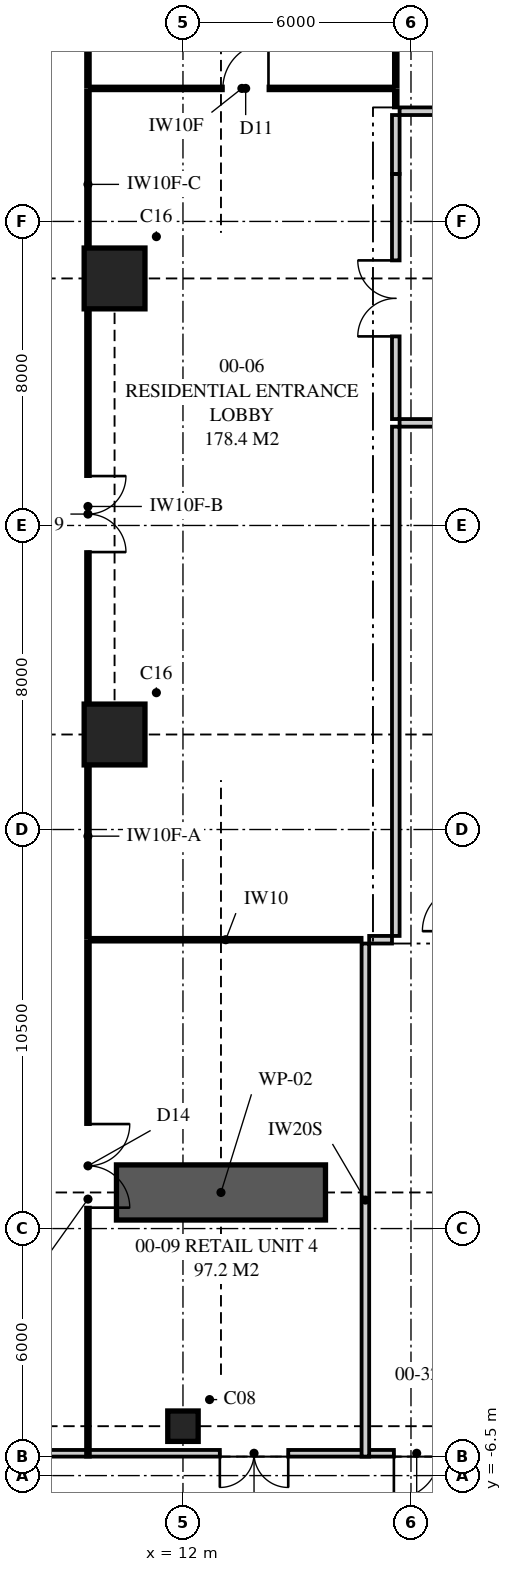
"""IFC4 building model, lengths in metres.
Left out: names, types, materials, properties, quantities, classifications, styles, units other than length and angle.
Written with IfcOpenShell. Run it as: python <this file> out.ifc"""

import sys

from ifc_helpers import new_model, si_unit, direction, frame, frame_2d, origin, origin_2d, place, context, subcontext, project, spatial, polyline, rectangle, outline, extrude, element, fill, save


model = new_model("IFC4")
c1 = context("Model", 3, precision=1e-05, world=origin(), true_north=direction((0.0, 1.0)))
c2 = subcontext(c1, "Body", "Model", "MODEL_VIEW")
j1 = project(units=[si_unit("LENGTHUNIT", "METRE"), si_unit("PLANEANGLEUNIT", "RADIAN")], contexts=[c1])
p1 = place(None, origin())
s1 = spatial("IfcSite", under=j1, at=p1, CompositionType="ELEMENT")
p2 = place(p1, origin())
s2 = spatial("IfcBuilding", under=s1, at=p2, CompositionType="ELEMENT")
p3 = place(p2, origin())
s3 = spatial("IfcBuildingStorey", under=s2, at=p3, CompositionType="ELEMENT", Elevation=0.0)
for number, where, z_axis, x_axis in (
    (1, (10.2, 13.0, 0.0), (0.0, 0.0, 1.0), (1.0, 0.0, 0.0)),
    (2, (10.2, 25.0, 0.0), (0.0, 0.0, 1.0), (1.0, 0.0, 0.0)),
):
    element("IfcColumn", number, at=place(p3, frame(where, z_axis=z_axis, x_axis=x_axis)), inside=s3, PredefinedType="COLUMN", context=c2, shape_type="SweptSolid", body=[
        extrude(rectangle(XDim=1.6, YDim=1.6, at=origin_2d()), origin(), (0.0, 0.0, 1.0), 6.0),
    ])
p4 = place(p3, frame((12.0, -5.2, 0.0), z_axis=(0.0, 0.0, 1.0), x_axis=(1.0, 0.0, 0.0)))
e3 = element("IfcColumn", 3, at=p4, inside=s3, PredefinedType="COLUMN", context=c2, shape_type="SweptSolid", body=[
    extrude(rectangle(XDim=0.8, YDim=0.8, at=origin_2d()), origin(), (0.0, 0.0, 1.0), 6.0),
])
p5 = place(p3, frame((-9.2, -5.913, 0.0), z_axis=(0.0, 0.0, 1.0), x_axis=(1.0, 0.0, 0.0)))
e4 = element("IfcWall", 4, at=p5, inside=s3, PredefinedType="SOLIDWALL", context=c2, shape_type="SweptSolid", body=[
    extrude(rectangle(XDim=68.4, YDim=0.175, at=frame_2d((34.2, 0.0))), origin(), (0.0, 0.0, 1.0), 5.12),
])
p6 = place(p5, frame((4.819, 0.0, 0.0)))
e5 = element("IfcOpeningElement", 5, at=p6, cuts=e4, PredefinedType="OPENING", context=c2, shape_type="SweptSolid", body=[
    extrude(rectangle(XDim=1.8, YDim=2.7, at=frame_2d((0.9, 1.35))), frame((0.0, 0.097, 0.0), z_axis=(0.0, -1.0, 0.0), x_axis=(1.0, 0.0, 0.0)), (0.0, 0.0, 1.0), 0.195),
])
p7 = place(p5, frame((0.871, 0.0, 0.3)))
e6 = element("IfcOpeningElement", 6, at=p7, cuts=e4, PredefinedType="OPENING", context=c2, shape_type="SweptSolid", body=[
    extrude(rectangle(XDim=2.4, YDim=3.0, at=frame_2d((1.2, 1.5))), frame((0.0, 0.097, 0.0), z_axis=(0.0, -1.0, 0.0), x_axis=(1.0, 0.0, 0.0)), (0.0, 0.0, 1.0), 0.195),
])
p8 = place(p5, frame((8.334, 0.0, 0.3)))
e7 = element("IfcOpeningElement", 7, at=p8, cuts=e4, PredefinedType="OPENING", context=c2, shape_type="SweptSolid", body=[
    extrude(rectangle(XDim=2.4, YDim=3.0, at=frame_2d((1.2, 1.5))), frame((0.0, 0.097, 0.0), z_axis=(0.0, -1.0, 0.0), x_axis=(1.0, 0.0, 0.0)), (0.0, 0.0, 1.0), 0.195),
])
p9 = place(p5, frame((14.45, 0.0, 0.0)))
e8 = element("IfcOpeningElement", 8, at=p9, cuts=e4, PredefinedType="OPENING", context=c2, shape_type="SweptSolid", body=[
    extrude(rectangle(XDim=2.0, YDim=2.7, at=frame_2d((1.0, 1.35))), frame((0.0, 0.097, 0.0), z_axis=(0.0, -1.0, 0.0), x_axis=(1.0, 0.0, 0.0)), (0.0, 0.0, 1.0), 0.195),
])
p10 = place(p5, frame((22.17, 0.0, 0.0)))
e9 = element("IfcOpeningElement", 9, at=p10, cuts=e4, PredefinedType="OPENING", context=c2, shape_type="SweptSolid", body=[
    extrude(rectangle(XDim=1.8, YDim=2.7, at=frame_2d((0.9, 1.35))), frame((0.0, 0.097, 0.0), z_axis=(0.0, -1.0, 0.0), x_axis=(1.0, 0.0, 0.0)), (0.0, 0.0, 1.0), 0.195),
])
p11 = place(p5, frame((26.75, 0.0, 0.0)))
e10 = element("IfcOpeningElement", 10, at=p11, cuts=e4, PredefinedType="OPENING", context=c2, shape_type="SweptSolid", body=[
    extrude(rectangle(XDim=1.2, YDim=2.1, at=frame_2d((0.6, 1.05))), frame((0.0, 0.097, 0.0), z_axis=(0.0, -1.0, 0.0), x_axis=(1.0, 0.0, 0.0)), (0.0, 0.0, 1.0), 0.195),
])
p12 = place(p5, frame((31.55, 0.0, 0.0)))
e11 = element("IfcOpeningElement", 11, at=p12, cuts=e4, PredefinedType="OPENING", context=c2, shape_type="SweptSolid", body=[
    extrude(rectangle(XDim=1.8, YDim=2.7, at=frame_2d((0.9, 1.35))), frame((0.0, 0.097, 0.0), z_axis=(0.0, -1.0, 0.0), x_axis=(1.0, 0.0, 0.0)), (0.0, 0.0, 1.0), 0.195),
])
p13 = place(p5, frame((40.85, 0.0, 0.0)))
e12 = element("IfcOpeningElement", 12, at=p13, cuts=e4, PredefinedType="OPENING", context=c2, shape_type="SweptSolid", body=[
    extrude(rectangle(XDim=1.8, YDim=2.7, at=frame_2d((0.9, 1.35))), frame((0.0, 0.097, 0.0), z_axis=(0.0, -1.0, 0.0), x_axis=(1.0, 0.0, 0.0)), (0.0, 0.0, 1.0), 0.195),
])
p14 = place(p5, frame((43.445, 0.0, 0.3)))
e13 = element("IfcOpeningElement", 13, at=p14, cuts=e4, PredefinedType="OPENING", context=c2, shape_type="SweptSolid", body=[
    extrude(rectangle(XDim=2.4, YDim=3.0, at=frame_2d((1.2, 1.5))), frame((0.0, 0.097, 0.0), z_axis=(0.0, -1.0, 0.0), x_axis=(1.0, 0.0, 0.0)), (0.0, 0.0, 1.0), 0.195),
])
p15 = place(p5, frame((47.7, 0.0, 0.0)))
e14 = element("IfcOpeningElement", 14, at=p15, cuts=e4, PredefinedType="OPENING", context=c2, shape_type="SweptSolid", body=[
    extrude(rectangle(XDim=1.2, YDim=2.1, at=frame_2d((0.6, 1.05))), frame((0.0, 0.097, 0.0), z_axis=(0.0, -1.0, 0.0), x_axis=(1.0, 0.0, 0.0)), (0.0, 0.0, 1.0), 0.195),
])
p16 = place(p5, frame((52.485, 0.0, 0.0)))
e15 = element("IfcOpeningElement", 15, at=p16, cuts=e4, PredefinedType="OPENING", context=c2, shape_type="SweptSolid", body=[
    extrude(rectangle(XDim=1.8, YDim=2.7, at=frame_2d((0.9, 1.35))), frame((0.0, 0.097, 0.0), z_axis=(0.0, -1.0, 0.0), x_axis=(1.0, 0.0, 0.0)), (0.0, 0.0, 1.0), 0.195),
])
p17 = place(p5, frame((63.159, 0.0, 0.0)))
e16 = element("IfcOpeningElement", 16, at=p17, cuts=e4, PredefinedType="OPENING", context=c2, shape_type="SweptSolid", body=[
    extrude(rectangle(XDim=1.8, YDim=2.7, at=frame_2d((0.9, 1.35))), frame((0.0, 0.097, 0.0), z_axis=(0.0, -1.0, 0.0), x_axis=(1.0, 0.0, 0.0)), (0.0, 0.0, 1.0), 0.195),
])
p18 = place(p5, frame((58.92, 0.0, 0.3)))
e17 = element("IfcOpeningElement", 17, at=p18, cuts=e4, PredefinedType="OPENING", context=c2, shape_type="SweptSolid", body=[
    extrude(rectangle(XDim=2.4, YDim=3.0, at=frame_2d((1.2, 1.5))), frame((0.0, 0.097, 0.0), z_axis=(0.0, -1.0, 0.0), x_axis=(1.0, 0.0, 0.0)), (0.0, 0.0, 1.0), 0.195),
])
p19 = place(p3, frame((9.5, 7.65, 0.0), z_axis=(0.0, 0.0, 1.0), x_axis=(0.0, 1.0, 0.0)))
e18 = element("IfcWall", 18, at=p19, inside=s3, PredefinedType="PARTITIONING", context=c2, shape_type="SweptSolid", body=[
    extrude(outline(polyline([(0.0, 0.0), (5.35, 0.0), (5.35, 5.12), (4.09, 5.12), (4.09, 5.72), (0.0, 5.72), (0.0, 0.0)])), frame((0.0, 0.05, 0.0), z_axis=(0.0, -1.0, 0.0), x_axis=(1.0, 0.0, 0.0)), (0.0, 0.0, 1.0), 0.1),
])
p20 = place(p3, frame((9.5, 13.0, 0.0), z_axis=(0.0, 0.0, 1.0), x_axis=(0.0, 1.0, 0.0)))
e19 = element("IfcWall", 19, at=p20, inside=s3, PredefinedType="PARTITIONING", context=c2, shape_type="SweptSolid", body=[
    extrude(rectangle(XDim=12.0, YDim=0.1, at=frame_2d((6.0, 0.0))), origin(), (0.0, 0.0, 1.0), 5.12),
])
p21 = place(p20, frame((4.8, 0.0, 0.0)))
e20 = element("IfcOpeningElement", 20, at=p21, cuts=e19, PredefinedType="OPENING", context=c2, shape_type="SweptSolid", body=[
    extrude(rectangle(XDim=2.0, YDim=2.4, at=frame_2d((1.0, 1.2))), frame((0.0, 0.06, 0.0), z_axis=(0.0, -1.0, 0.0), x_axis=(1.0, 0.0, 0.0)), (0.0, 0.0, 1.0), 0.12),
])
p22 = place(p3, frame((9.5, 25.0, 0.0), z_axis=(0.0, 0.0, 1.0), x_axis=(0.0, 1.0, 0.0)))
e21 = element("IfcWall", 21, at=p22, inside=s3, PredefinedType="PARTITIONING", context=c2, shape_type="SweptSolid", body=[
    extrude(outline(polyline([(0.0, 0.0), (4.95, 0.0), (4.95, 5.72), (1.26, 5.72), (1.26, 5.12), (0.0, 5.12), (0.0, 0.0)])), frame((0.0, 0.05, 0.0), z_axis=(0.0, -1.0, 0.0), x_axis=(1.0, 0.0, 0.0)), (0.0, 0.0, 1.0), 0.1),
])
p23 = place(p3, frame((9.5, 30.05, 0.0), z_axis=(0.0, 0.0, 1.0), x_axis=(0.0, 1.0, 0.0)))
e22 = element("IfcWall", 22, at=p23, inside=s3, PredefinedType="PARTITIONING", context=c2, shape_type="SweptSolid", body=[
    extrude(outline(polyline([(0.0, 0.0), (5.9, 0.0), (5.9, 5.72), (5.9, 4.92), (5.74, 4.92), (5.74, 5.72), (0.0, 5.72), (0.0, 0.0)])), frame((0.0, 0.05, 0.0), z_axis=(0.0, -1.0, 0.0), x_axis=(1.0, 0.0, 0.0)), (0.0, 0.0, 1.0), 0.1),
])
p24 = place(p23, frame((2.45, 0.0, 0.0)))
e23 = element("IfcOpeningElement", 23, at=p24, cuts=e22, PredefinedType="OPENING", context=c2, shape_type="SweptSolid", body=[
    extrude(rectangle(XDim=1.2, YDim=2.2, at=frame_2d((0.6, 1.1))), frame((0.0, 0.06, 0.0), z_axis=(0.0, -1.0, 0.0), x_axis=(1.0, 0.0, 0.0)), (0.0, 0.0, 1.0), 0.12),
])
p25 = place(p3, frame((9.5, -6.0, 0.0), z_axis=(0.0, 0.0, 1.0), x_axis=(0.0, 1.0, 0.0)))
e24 = element("IfcWall", 24, at=p25, inside=s3, PredefinedType="PARTITIONING", context=c2, shape_type="SweptSolid", body=[
    extrude(outline(polyline([(0.0, 0.0), (13.55, 0.0), (13.55, 5.72), (8.21, 5.72), (8.21, 4.92), (5.69, 4.92), (5.69, 5.72), (2.06, 5.72), (2.06, 5.12), (0.0, 5.12), (0.0, 5.72), (0.0, 0.0)])), frame((0.0, 0.05, 0.0), z_axis=(0.0, -1.0, 0.0), x_axis=(1.0, 0.0, 0.0)), (0.0, 0.0, 1.0), 0.1),
])
p26 = place(p25, frame((6.55, 0.0, 0.0)))
e25 = element("IfcOpeningElement", 25, at=p26, cuts=e24, PredefinedType="OPENING", context=c2, shape_type="SweptSolid", body=[
    extrude(rectangle(XDim=2.2, YDim=2.7, at=frame_2d((1.1, 1.35))), frame((0.0, 0.06, 0.0), z_axis=(0.0, -1.0, 0.0), x_axis=(1.0, 0.0, 0.0)), (0.0, 0.0, 1.0), 0.12),
])
p27 = place(p3, frame((9.55, 30.0, 0.0), z_axis=(0.0, 0.0, 1.0), x_axis=(1.0, 0.0, 0.0)))
e26 = element("IfcWall", 26, at=p27, inside=s3, PredefinedType="PARTITIONING", context=c2, shape_type="SweptSolid", body=[
    extrude(outline(polyline([(0.0, 0.0), (8.0, 0.0), (8.0, 5.72), (4.71, 5.72), (4.71, 5.12), (2.19, 5.12), (2.19, 5.72), (0.0, 5.72), (0.0, 0.0)])), frame((0.0, 0.05, 0.0), z_axis=(0.0, -1.0, 0.0), x_axis=(1.0, 0.0, 0.0)), (0.0, 0.0, 1.0), 0.1),
])
p28 = place(p27, frame((3.5, 0.0, 0.0)))
e27 = element("IfcOpeningElement", 27, at=p28, cuts=e26, PredefinedType="OPENING", context=c2, shape_type="SweptSolid", body=[
    extrude(rectangle(XDim=1.2, YDim=2.2, at=frame_2d((0.6, 1.1))), frame((0.0, 0.06, 0.0), z_axis=(0.0, -1.0, 0.0), x_axis=(1.0, 0.0, 0.0)), (0.0, 0.0, 1.0), 0.12),
])
p29 = place(p3, frame((9.55, 7.6, 0.0), z_axis=(0.0, 0.0, 1.0), x_axis=(1.0, 0.0, 0.0)))
e28 = element("IfcWall", 28, at=p29, inside=s3, PredefinedType="PARTITIONING", context=c2, shape_type="SweptSolid", body=[
    extrude(outline(polyline([(0.0, 0.0), (7.15, 0.0), (7.15, 5.72), (4.71, 5.72), (4.71, 5.12), (2.19, 5.12), (2.19, 5.72), (0.0, 5.72), (0.0, 0.0)])), frame((0.0, 0.05, 0.0), z_axis=(0.0, -1.0, 0.0), x_axis=(1.0, 0.0, 0.0)), (0.0, 0.0, 1.0), 0.1),
])
p30 = place(p3, frame((17.6, 27.75, 0.0), z_axis=(0.0, 0.0, 1.0), x_axis=(0.0, 1.0, 0.0)))
e29 = element("IfcWall", 29, at=p30, inside=s3, PredefinedType="PARTITIONING", context=c2, shape_type="SweptSolid", body=[
    extrude(rectangle(XDim=1.55, YDim=0.2, at=frame_2d((0.775, 0.0))), origin(), (0.0, 0.0, 1.0), 5.72),
])
p31 = place(p3, frame((17.6, 21.3, 0.0), z_axis=(0.0, 0.0, 1.0), x_axis=(0.0, 1.0, 0.0)))
e30 = element("IfcWall", 30, at=p31, inside=s3, PredefinedType="PARTITIONING", context=c2, shape_type="SweptSolid", body=[
    extrude(outline(polyline([(0.0, 0.0), (6.45, 0.0), (6.45, 5.72), (5.01, 5.72), (5.01, 5.12), (2.39, 5.12), (2.39, 5.72), (0.0, 5.72), (0.0, 0.0)])), frame((0.0, 0.1, 0.0), z_axis=(0.0, -1.0, 0.0), x_axis=(1.0, 0.0, 0.0)), (0.0, 0.0, 1.0), 0.2),
])
p32 = place(p31, frame((2.175, 0.0, 0.0)))
e31 = element("IfcOpeningElement", 31, at=p32, cuts=e30, PredefinedType="OPENING", context=c2, shape_type="SweptSolid", body=[
    extrude(rectangle(XDim=2.0, YDim=2.4, at=frame_2d((1.0, 1.2))), frame((0.0, 0.11, 0.0), z_axis=(0.0, -1.0, 0.0), x_axis=(1.0, 0.0, 0.0)), (0.0, 0.0, 1.0), 0.22),
])
p33 = place(p3, frame((17.6, 29.5, 0.0), z_axis=(0.0, 0.0, 1.0), x_axis=(0.0, 1.0, 0.0)))
e32 = element("IfcWall", 32, at=p33, inside=s3, PredefinedType="PARTITIONING", context=c2, shape_type="SweptSolid", body=[
    extrude(rectangle(XDim=0.45, YDim=0.1, at=frame_2d((0.225, 0.0))), origin(), (0.0, 0.0, 1.0), 5.72),
])
p34 = place(p3, frame((17.6, 7.7, 0.0), z_axis=(0.0, 0.0, 1.0), x_axis=(0.0, 1.0, 0.0)))
e33 = element("IfcWall", 33, at=p34, inside=s3, PredefinedType="SOLIDWALL", context=c2, shape_type="SweptSolid", body=[
    extrude(outline(polyline([(0.0, 0.0), (13.4, 0.0), (13.4, 5.72), (6.61, 5.72), (6.61, 5.12), (3.99, 5.12), (3.99, 5.72), (0.0, 5.72), (0.0, 0.0)])), frame((0.0, 0.1, 0.0), z_axis=(0.0, -1.0, 0.0), x_axis=(1.0, 0.0, 0.0)), (0.0, 0.0, 1.0), 0.2),
])
p35 = place(p3, frame((16.9, 7.6, 0.0), z_axis=(0.0, 0.0, 1.0), x_axis=(1.0, 0.0, 0.0)))
e34 = element("IfcWall", 34, at=p35, inside=s3, PredefinedType="SOLIDWALL", context=c2, shape_type="SweptSolid", body=[
    extrude(rectangle(XDim=0.6, YDim=0.2, at=frame_2d((0.3, 0.0))), origin(), (0.0, 0.0, 1.0), 5.72),
])
p36 = place(p3, frame((17.6, 30.05, 0.0), z_axis=(0.0, 0.0, 1.0), x_axis=(0.0, 1.0, 0.0)))
e35 = element("IfcWall", 35, at=p36, inside=s3, PredefinedType="PARTITIONING", context=c2, shape_type="SweptSolid", body=[
    extrude(rectangle(XDim=3.9, YDim=0.1, at=frame_2d((1.95, 0.0))), origin(), (0.0, 0.0, 1.0), 5.72),
])
p37 = place(p3, frame((16.8, -6.0, 0.0), z_axis=(0.0, 0.0, 1.0), x_axis=(0.0, 1.0, 0.0)))
e36 = element("IfcWall", 36, at=p37, inside=s3, PredefinedType="SOLIDWALL", context=c2, shape_type="SweptSolid", body=[
    extrude(outline(polyline([(0.0, 0.0), (13.5, 0.0), (13.5, 5.72), (8.26, 5.72), (8.26, 5.12), (5.64, 5.12), (5.64, 5.72), (2.11, 5.72), (2.11, 5.12), (0.0, 5.12), (0.0, 5.72), (0.0, 0.0)])), frame((0.0, 0.1, 0.0), z_axis=(0.0, -1.0, 0.0), x_axis=(1.0, 0.0, 0.0)), (0.0, 0.0, 1.0), 0.2),
])
p38 = place(p3, frame((17.7, 29.4, 0.0), z_axis=(0.0, 0.0, 1.0), x_axis=(1.0, 0.0, 0.0)))
e37 = element("IfcWall", 37, at=p38, inside=s3, PredefinedType="PARTITIONING", context=c2, shape_type="SweptSolid", body=[
    extrude(outline(polyline([(0.0, 0.0), (12.225, 0.0), (12.225, 5.72), (7.61, 5.72), (7.61, 5.12), (4.99, 5.12), (4.99, 5.72), (0.0, 5.72), (0.0, 0.0)])), frame((0.0, 0.1, 0.0), z_axis=(0.0, -1.0, 0.0), x_axis=(1.0, 0.0, 0.0)), (0.0, 0.0, 1.0), 0.2),
])
p39 = place(p38, frame((5.6, 0.0, 0.0)))
e38 = element("IfcOpeningElement", 38, at=p39, cuts=e37, PredefinedType="OPENING", context=c2, shape_type="SweptSolid", body=[
    extrude(rectangle(XDim=1.0, YDim=2.1, at=frame_2d((0.5, 1.05))), frame((0.0, 0.11, 0.0), z_axis=(0.0, -1.0, 0.0), x_axis=(1.0, 0.0, 0.0)), (0.0, 0.0, 1.0), 0.22),
])
p40 = place(p3, frame((17.7, 21.2, 0.0), z_axis=(0.0, 0.0, 1.0), x_axis=(1.0, 0.0, 0.0)))
e39 = element("IfcWall", 39, at=p40, inside=s3, PredefinedType="SOLIDWALL", context=c2, shape_type="SweptSolid", body=[
    extrude(rectangle(XDim=1.8, YDim=0.2, at=frame_2d((0.9, 0.0))), origin(), (0.0, 0.0, 1.0), 5.72),
])
p41 = place(p3, frame((10.25, 0.95, 0.0), z_axis=(0.0, 0.0, 1.0), x_axis=(1.0, 0.0, 0.0)))
e40 = element("IfcWall", 40, at=p41, inside=s3, PredefinedType="SHEAR", context=c2, shape_type="SweptSolid", body=[
    extrude(rectangle(XDim=5.5, YDim=1.45, at=frame_2d((2.75, 0.0))), origin(), (0.0, 0.0, 1.0), 6.0),
])
p42 = place(p10, frame((1.8, 0.0, 0.0), z_axis=(0.0, 0.0, 1.0), x_axis=(-1.0, 0.0, 0.0)))
e41 = element("IfcDoor", 41, at=p42, inside=s3, OperationType="DOUBLE_DOOR_SINGLE_SWING", PredefinedType="DOOR", context=c2, shape_type="SweptSolid", body=[
    extrude(rectangle(XDim=1.8, YDim=2.7, at=frame_2d((0.9, 1.35))), frame((0.0, 0.025, 0.0), z_axis=(0.0, -1.0, 0.0), x_axis=(1.0, 0.0, 0.0)), (0.0, 0.0, 1.0), 0.05),
])
fill(e9, e41)
p43 = place(p11, frame((1.2, 0.0, 0.0), z_axis=(0.0, 0.0, 1.0), x_axis=(-1.0, 0.0, 0.0)))
e42 = element("IfcDoor", 42, at=p43, inside=s3, OperationType="SINGLE_SWING_RIGHT", PredefinedType="DOOR", context=c2, shape_type="SweptSolid", body=[
    extrude(rectangle(XDim=1.2, YDim=2.1, at=frame_2d((0.6, 1.05))), frame((0.0, 0.025, 0.0), z_axis=(0.0, -1.0, 0.0), x_axis=(1.0, 0.0, 0.0)), (0.0, 0.0, 1.0), 0.05),
])
fill(e10, e42)
p44 = place(p21, frame((2.0, 0.0, 0.0), z_axis=(0.0, 0.0, 1.0), x_axis=(-1.0, 0.0, 0.0)))
e43 = element("IfcDoor", 43, at=p44, inside=s3, OperationType="DOUBLE_DOOR_SINGLE_SWING", PredefinedType="DOOR", context=c2, shape_type="SweptSolid", body=[
    extrude(rectangle(XDim=2.0, YDim=2.4, at=frame_2d((1.0, 1.2))), frame((0.0, 0.025, 0.0), z_axis=(0.0, -1.0, 0.0), x_axis=(1.0, 0.0, 0.0)), (0.0, 0.0, 1.0), 0.05),
])
fill(e20, e43)
p45 = place(p26, frame((2.2, 0.0, 0.0), z_axis=(0.0, 0.0, 1.0), x_axis=(-1.0, 0.0, 0.0)))
e44 = element("IfcDoor", 44, at=p45, inside=s3, OperationType="DOUBLE_DOOR_SINGLE_SWING", PredefinedType="DOOR", context=c2, shape_type="SweptSolid", body=[
    extrude(rectangle(XDim=2.2, YDim=2.7, at=frame_2d((1.1, 1.35))), frame((0.0, 0.025, 0.0), z_axis=(0.0, -1.0, 0.0), x_axis=(1.0, 0.0, 0.0)), (0.0, 0.0, 1.0), 0.05),
])
fill(e25, e44)
p46 = place(p28, origin())
e45 = element("IfcDoor", 45, at=p46, inside=s3, OperationType="SINGLE_SWING_RIGHT", PredefinedType="DOOR", context=c2, shape_type="SweptSolid", body=[
    extrude(rectangle(XDim=1.2, YDim=2.2, at=frame_2d((0.6, 1.1))), frame((0.0, 0.025, 0.0), z_axis=(0.0, -1.0, 0.0), x_axis=(1.0, 0.0, 0.0)), (0.0, 0.0, 1.0), 0.05),
])
fill(e27, e45)
p47 = place(p32, origin())
e46 = element("IfcDoor", 46, at=p47, inside=s3, OperationType="DOUBLE_DOOR_SINGLE_SWING", PredefinedType="DOOR", context=c2, shape_type="SweptSolid", body=[
    extrude(rectangle(XDim=2.0, YDim=2.4, at=frame_2d((1.0, 1.2))), frame((0.0, 0.025, 0.0), z_axis=(0.0, -1.0, 0.0), x_axis=(1.0, 0.0, 0.0)), (0.0, 0.0, 1.0), 0.05),
])
fill(e31, e46)
save(model, sys.argv[1])
